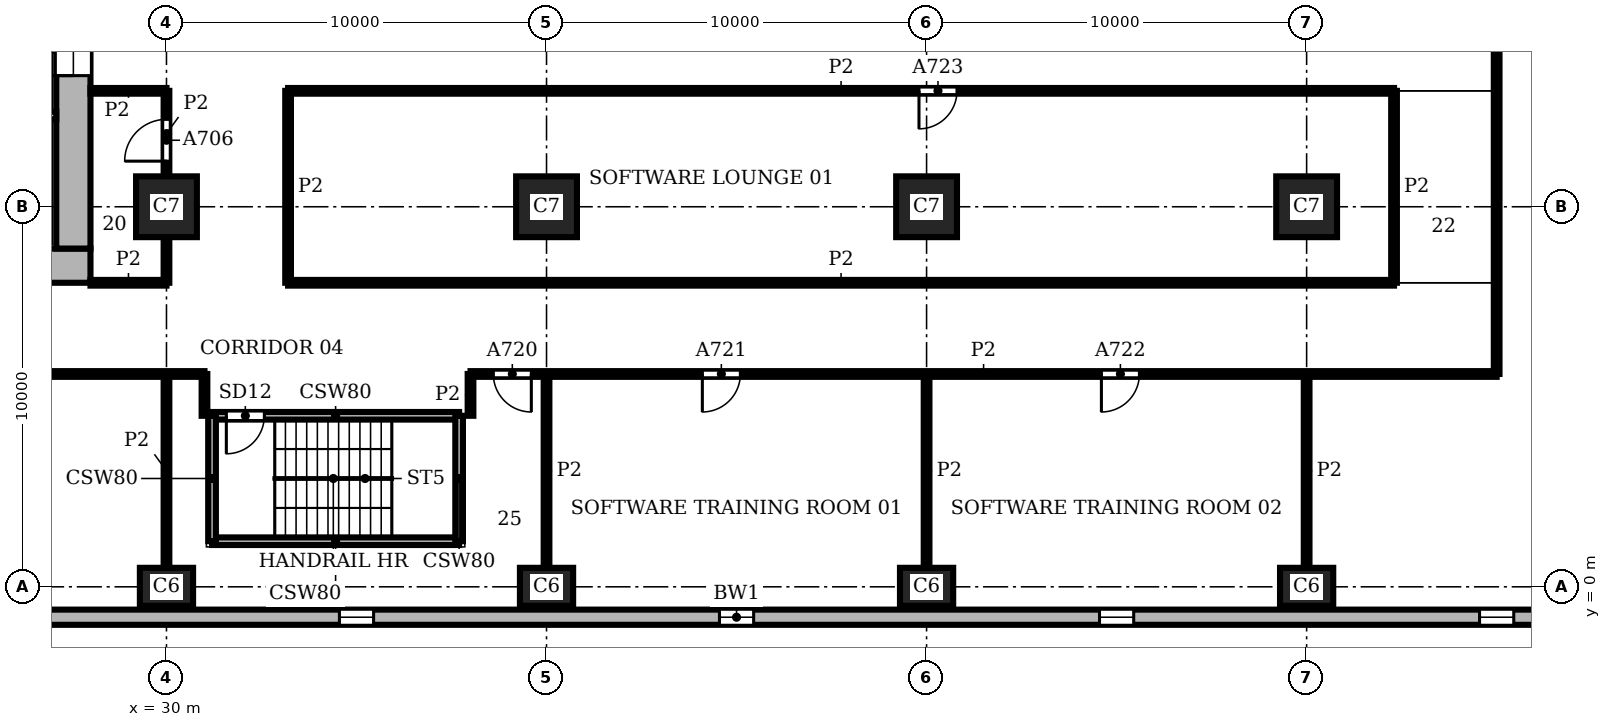
"""IFC4 building model, lengths in metres.
Left out: names, types, materials, properties, quantities, classifications, styles, units other than length and angle.
Written with IfcOpenShell. Run it as: python <this file> out.ifc"""

import sys

from ifc_helpers import new_model, si_unit, direction, frame, frame_2d, origin, origin_2d, place, context, subcontext, project, spatial, rectangle, extrude, element, fill, save


model = new_model("IFC4")
c1 = context("Model", 3, precision=1e-05, world=origin(), true_north=direction((0.0, 1.0)))
c2 = subcontext(c1, "Body", "Model", "MODEL_VIEW")
j1 = project(units=[si_unit("LENGTHUNIT", "METRE"), si_unit("PLANEANGLEUNIT", "RADIAN")], contexts=[c1])
p1 = place(None, origin())
s1 = spatial("IfcSite", under=j1, at=p1, CompositionType="ELEMENT")
p2 = place(p1, origin())
s2 = spatial("IfcBuilding", under=s1, at=p2, CompositionType="ELEMENT")
p3 = place(p2, frame((0.0, 0.0, 86.1)))
s3 = spatial("IfcBuildingStorey", under=s2, at=p3, CompositionType="ELEMENT", Elevation=86.1)
for number, where, z_axis, x_axis in (
    (1, (30.0, 0.0, 0.0), (0.0, 0.0, 1.0), (1.0, 0.0, 0.0)),
    (2, (40.0, 0.0, 0.0), (0.0, 0.0, 1.0), (1.0, 0.0, 0.0)),
    (3, (50.0, 0.0, 0.0), (0.0, 0.0, 1.0), (1.0, 0.0, 0.0)),
    (4, (60.0, 0.0, 0.0), (0.0, 0.0, 1.0), (1.0, 0.0, 0.0)),
):
    element("IfcColumn", number, at=place(p3, frame(where, z_axis=z_axis, x_axis=x_axis)), inside=s3, PredefinedType="COLUMN", context=c2, shape_type="SweptSolid", body=[
        extrude(rectangle(XDim=1.4, YDim=1.0, at=origin_2d()), origin(), (0.0, 0.0, 1.0), 3.9),
    ])
for number, where, z_axis, x_axis in (
    (5, (30.0, 10.0, 0.0), (0.0, 0.0, 1.0), (1.0, 0.0, 0.0)),
    (6, (40.0, 10.0, 0.0), (0.0, 0.0, 1.0), (1.0, 0.0, 0.0)),
    (7, (50.0, 10.0, 0.0), (0.0, 0.0, 1.0), (1.0, 0.0, 0.0)),
    (8, (60.0, 10.0, 0.0), (0.0, 0.0, 1.0), (1.0, 0.0, 0.0)),
):
    element("IfcColumn", number, at=place(p3, frame(where, z_axis=z_axis, x_axis=x_axis)), inside=s3, PredefinedType="COLUMN", context=c2, shape_type="SweptSolid", body=[
        extrude(rectangle(XDim=1.6, YDim=1.6, at=origin_2d()), origin(), (0.0, 0.0, 1.0), 3.9),
    ])
p4 = place(p3, frame((8.0, 8.45, 0.0), z_axis=(0.0, 0.0, 1.0), x_axis=(1.0, 0.0, 0.0)))
e9 = element("IfcWall", 9, at=p4, inside=s3, PredefinedType="SHEAR", context=c2, shape_type="SweptSolid", body=[
    extrude(rectangle(XDim=20.0, YDim=0.9, at=frame_2d((10.0, 0.0))), origin(), (0.0, 0.0, 1.0), 3.9),
])
p5 = place(p3, frame((27.55, 8.9, 0.0), z_axis=(0.0, 0.0, 1.0), x_axis=(0.0, 1.0, 0.0)))
e10 = element("IfcWall", 10, at=p5, inside=s3, PredefinedType="SHEAR", context=c2, shape_type="SweptSolid", body=[
    extrude(rectangle(XDim=18.2, YDim=0.9, at=frame_2d((9.1, 0.0))), origin(), (0.0, 0.0, 1.0), 3.9),
])
p6 = place(p5, frame((4.55, 0.0, 0.0)))
e11 = element("IfcOpeningElement", 11, at=p6, cuts=e10, PredefinedType="OPENING", context=c2, shape_type="SweptSolid", body=[
    extrude(rectangle(XDim=1.6, YDim=2.1, at=frame_2d((0.8, 1.05))), frame((0.0, 0.46, 0.0), z_axis=(0.0, -1.0, 0.0), x_axis=(1.0, 0.0, 0.0)), (0.0, 0.0, 1.0), 0.92),
])
p7 = place(p3, frame((20.8, -0.8, 0.0), z_axis=(0.0, 0.0, 1.0), x_axis=(1.0, 0.0, 0.0)))
e12 = element("IfcWall", 12, at=p7, inside=s3, PredefinedType="SOLIDWALL", context=c2, shape_type="SweptSolid", body=[
    extrude(rectangle(XDim=48.4, YDim=0.4, at=frame_2d((24.2, 0.0))), origin(), (0.0, 0.0, 1.0), 3.9),
])
p8 = place(p7, frame((3.75, 0.0, 0.9)))
e13 = element("IfcOpeningElement", 13, at=p8, cuts=e12, PredefinedType="OPENING", context=c2, shape_type="SweptSolid", body=[
    extrude(rectangle(XDim=0.9, YDim=2.35, at=frame_2d((0.45, 1.175))), frame((0.0, 0.21, 0.0), z_axis=(0.0, -1.0, 0.0), x_axis=(1.0, 0.0, 0.0)), (0.0, 0.0, 1.0), 0.42),
])
p9 = place(p7, frame((13.75, 0.0, 0.9)))
e14 = element("IfcOpeningElement", 14, at=p9, cuts=e12, PredefinedType="OPENING", context=c2, shape_type="SweptSolid", body=[
    extrude(rectangle(XDim=0.9, YDim=2.35, at=frame_2d((0.45, 1.175))), frame((0.0, 0.21, 0.0), z_axis=(0.0, -1.0, 0.0), x_axis=(1.0, 0.0, 0.0)), (0.0, 0.0, 1.0), 0.42),
])
p10 = place(p7, frame((23.75, 0.0, 0.9)))
e15 = element("IfcOpeningElement", 15, at=p10, cuts=e12, PredefinedType="OPENING", context=c2, shape_type="SweptSolid", body=[
    extrude(rectangle(XDim=0.9, YDim=2.35, at=frame_2d((0.45, 1.175))), frame((0.0, 0.21, 0.0), z_axis=(0.0, -1.0, 0.0), x_axis=(1.0, 0.0, 0.0)), (0.0, 0.0, 1.0), 0.42),
])
p11 = place(p7, frame((33.75, 0.0, 0.9)))
e16 = element("IfcOpeningElement", 16, at=p11, cuts=e12, PredefinedType="OPENING", context=c2, shape_type="SweptSolid", body=[
    extrude(rectangle(XDim=0.9, YDim=2.35, at=frame_2d((0.45, 1.175))), frame((0.0, 0.21, 0.0), z_axis=(0.0, -1.0, 0.0), x_axis=(1.0, 0.0, 0.0)), (0.0, 0.0, 1.0), 0.42),
])
p12 = place(p7, frame((43.75, 0.0, 0.9)))
e17 = element("IfcOpeningElement", 17, at=p12, cuts=e12, PredefinedType="OPENING", context=c2, shape_type="SweptSolid", body=[
    extrude(rectangle(XDim=0.9, YDim=2.35, at=frame_2d((0.45, 1.175))), frame((0.0, 0.21, 0.0), z_axis=(0.0, -1.0, 0.0), x_axis=(1.0, 0.0, 0.0)), (0.0, 0.0, 1.0), 0.42),
])
p13 = place(p3, frame((31.2, 1.2, 0.0), z_axis=(0.0, 0.0, 1.0), x_axis=(1.0, 0.0, 0.0)))
e18 = element("IfcWall", 18, at=p13, inside=s3, PredefinedType="SHEAR", context=c2, shape_type="SweptSolid", body=[
    extrude(rectangle(XDim=6.5, YDim=0.2, at=frame_2d((3.25, 0.0))), origin(), (0.0, 0.0, 1.0), 3.58),
])
p14 = place(p3, frame((31.2, 4.5, 0.0), z_axis=(0.0, 0.0, 1.0), x_axis=(1.0, 0.0, 0.0)))
e19 = element("IfcWall", 19, at=p14, inside=s3, PredefinedType="SHEAR", context=c2, shape_type="SweptSolid", body=[
    extrude(rectangle(XDim=6.5, YDim=0.2, at=frame_2d((3.25, 0.0))), origin(), (0.0, 0.0, 1.0), 3.58),
])
p15 = place(p14, frame((0.375, 0.0, 0.0)))
e20 = element("IfcOpeningElement", 20, at=p15, cuts=e19, PredefinedType="OPENING", context=c2, shape_type="SweptSolid", body=[
    extrude(rectangle(XDim=1.0, YDim=2.1, at=frame_2d((0.5, 1.05))), frame((0.0, 0.11, 0.0), z_axis=(0.0, -1.0, 0.0), x_axis=(1.0, 0.0, 0.0)), (0.0, 0.0, 1.0), 0.22),
])
p16 = place(p3, frame((13.8, 12.4, 0.0), z_axis=(0.0, 0.0, 1.0), x_axis=(1.0, 0.0, 0.0)))
e21 = element("IfcWall", 21, at=p16, inside=s3, PredefinedType="SHEAR", context=c2, shape_type="SweptSolid", body=[
    extrude(rectangle(XDim=13.3, YDim=0.2, at=frame_2d((6.65, 0.0))), origin(), (0.0, 0.0, 1.0), 3.58),
])
p17 = place(p16, frame((2.4, 0.0, 0.0)))
e22 = element("IfcOpeningElement", 22, at=p17, cuts=e21, PredefinedType="OPENING", context=c2, shape_type="SweptSolid", body=[
    extrude(rectangle(XDim=1.1, YDim=2.1, at=frame_2d((0.55, 1.05))), frame((0.0, 0.11, 0.0), z_axis=(0.0, -1.0, 0.0), x_axis=(1.0, 0.0, 0.0)), (0.0, 0.0, 1.0), 0.22),
])
p18 = place(p16, frame((4.9, 0.0, 0.0)))
e23 = element("IfcOpeningElement", 23, at=p18, cuts=e21, PredefinedType="OPENING", context=c2, shape_type="SweptSolid", body=[
    extrude(rectangle(XDim=1.1, YDim=2.1, at=frame_2d((0.55, 1.05))), frame((0.0, 0.11, 0.0), z_axis=(0.0, -1.0, 0.0), x_axis=(1.0, 0.0, 0.0)), (0.0, 0.0, 1.0), 0.22),
])
p19 = place(p16, frame((0.25, 0.0, 0.0)))
e24 = element("IfcOpeningElement", 24, at=p19, cuts=e21, PredefinedType="OPENING", context=c2, shape_type="SweptSolid", body=[
    extrude(rectangle(XDim=1.0, YDim=2.1, at=frame_2d((0.5, 1.05))), frame((0.0, 0.11, 0.0), z_axis=(0.0, -1.0, 0.0), x_axis=(1.0, 0.0, 0.0)), (0.0, 0.0, 1.0), 0.22),
])
for number, where, z_axis, x_axis in (
    (25, (31.2, 1.2, 0.0), (0.0, 0.0, 1.0), (0.0, 1.0, 0.0)),
    (26, (37.7, 1.2, 0.0), (0.0, 0.0, 1.0), (0.0, 1.0, 0.0)),
):
    element("IfcWall", number, at=place(p3, frame(where, z_axis=z_axis, x_axis=x_axis)), inside=s3, PredefinedType="SHEAR", context=c2, shape_type="SweptSolid", body=[
        extrude(rectangle(XDim=3.3, YDim=0.2, at=frame_2d((1.65, 0.0))), origin(), (0.0, 0.0, 1.0), 3.58),
    ])
p20 = place(p3, frame((30.0, 0.5, 0.0), z_axis=(0.0, 0.0, 1.0), x_axis=(0.0, 1.0, 0.0)))
e27 = element("IfcWall", 27, at=p20, inside=s3, PredefinedType="PARTITIONING", context=c2, shape_type="SweptSolid", body=[
    extrude(rectangle(XDim=5.1, YDim=0.15, at=frame_2d((2.55, 0.0))), origin(), (0.0, 0.0, 1.0), 3.58),
])
p21 = place(p3, frame((30.0, 8.0, 0.0), z_axis=(0.0, 0.0, 1.0), x_axis=(0.0, 1.0, 0.0)))
e28 = element("IfcWall", 28, at=p21, inside=s3, PredefinedType="PARTITIONING", context=c2, shape_type="SweptSolid", body=[
    extrude(rectangle(XDim=1.2, YDim=0.15, at=frame_2d((0.6, 0.0))), origin(), (0.0, 0.0, 1.0), 3.58),
])
p22 = place(p3, frame((30.0, 10.8, 0.0), z_axis=(0.0, 0.0, 1.0), x_axis=(0.0, 1.0, 0.0)))
e29 = element("IfcWall", 29, at=p22, inside=s3, PredefinedType="PARTITIONING", context=c2, shape_type="SweptSolid", body=[
    extrude(rectangle(XDim=2.25, YDim=0.15, at=frame_2d((1.125, 0.0))), origin(), (0.0, 0.0, 1.0), 3.58),
])
p23 = place(p22, frame((0.4, 0.0, 0.0)))
e30 = element("IfcOpeningElement", 30, at=p23, cuts=e29, PredefinedType="OPENING", context=c2, shape_type="SweptSolid", body=[
    extrude(rectangle(XDim=1.1, YDim=2.1, at=frame_2d((0.55, 1.05))), frame((0.0, 0.085, 0.0), z_axis=(0.0, -1.0, 0.0), x_axis=(1.0, 0.0, 0.0)), (0.0, 0.0, 1.0), 0.17),
])
p24 = place(p3, frame((31.0, 4.5, 0.0), z_axis=(0.0, 0.0, 1.0), x_axis=(0.0, 1.0, 0.0)))
e31 = element("IfcWall", 31, at=p24, inside=s3, PredefinedType="PARTITIONING", context=c2, shape_type="SweptSolid", body=[
    extrude(rectangle(XDim=1.1, YDim=0.15, at=frame_2d((0.55, 0.0))), origin(), (0.0, 0.0, 1.0), 3.58),
])
p25 = place(p3, frame((33.2, 8.0, 0.0), z_axis=(0.0, 0.0, 1.0), x_axis=(0.0, 1.0, 0.0)))
e32 = element("IfcWall", 32, at=p25, inside=s3, PredefinedType="PARTITIONING", context=c2, shape_type="SweptSolid", body=[
    extrude(rectangle(XDim=5.05, YDim=0.15, at=frame_2d((2.525, 0.0))), origin(), (0.0, 0.0, 1.0), 3.58),
])
p26 = place(p3, frame((38.0, 4.5, 0.0), z_axis=(0.0, 0.0, 1.0), x_axis=(0.0, 1.0, 0.0)))
e33 = element("IfcWall", 33, at=p26, inside=s3, PredefinedType="PARTITIONING", context=c2, shape_type="SweptSolid", body=[
    extrude(rectangle(XDim=1.1, YDim=0.15, at=frame_2d((0.55, 0.0))), origin(), (0.0, 0.0, 1.0), 3.58),
])
for number, where, z_axis, x_axis in (
    (34, (40.0, 0.5, 0.0), (0.0, 0.0, 1.0), (0.0, 1.0, 0.0)),
    (35, (50.0, 0.5, 0.0), (0.0, 0.0, 1.0), (0.0, 1.0, 0.0)),
    (36, (60.0, 0.5, 0.0), (0.0, 0.0, 1.0), (0.0, 1.0, 0.0)),
):
    element("IfcWall", number, at=place(p3, frame(where, z_axis=z_axis, x_axis=x_axis)), inside=s3, PredefinedType="PARTITIONING", context=c2, shape_type="SweptSolid", body=[
        extrude(rectangle(XDim=5.1, YDim=0.15, at=frame_2d((2.55, 0.0))), origin(), (0.0, 0.0, 1.0), 3.58),
    ])
p27 = place(p3, frame((62.3, 8.0, 0.0), z_axis=(0.0, 0.0, 1.0), x_axis=(0.0, 1.0, 0.0)))
e37 = element("IfcWall", 37, at=p27, inside=s3, PredefinedType="PARTITIONING", context=c2, shape_type="SweptSolid", body=[
    extrude(rectangle(XDim=5.05, YDim=0.15, at=frame_2d((2.525, 0.0))), origin(), (0.0, 0.0, 1.0), 3.58),
])
p28 = place(p3, frame((65.0, 5.6, 0.0), z_axis=(0.0, 0.0, 1.0), x_axis=(0.0, 1.0, 0.0)))
e38 = element("IfcWall", 38, at=p28, inside=s3, PredefinedType="PARTITIONING", context=c2, shape_type="SweptSolid", body=[
    extrude(rectangle(XDim=19.35, YDim=0.15, at=frame_2d((9.675, 0.0))), origin(), (0.0, 0.0, 1.0), 3.58),
])
p29 = place(p3, frame((5.6, 5.6, 0.0), z_axis=(0.0, 0.0, 1.0), x_axis=(1.0, 0.0, 0.0)))
e39 = element("IfcWall", 39, at=p29, inside=s3, PredefinedType="PARTITIONING", context=c2, shape_type="SweptSolid", body=[
    extrude(rectangle(XDim=25.4, YDim=0.15, at=frame_2d((12.7, 0.0))), origin(), (0.0, 0.0, 1.0), 3.58),
])
p30 = place(p29, frame((4.6, 0.0, 0.0)))
e40 = element("IfcOpeningElement", 40, at=p30, cuts=e39, PredefinedType="OPENING", context=c2, shape_type="SweptSolid", body=[
    extrude(rectangle(XDim=1.0, YDim=2.1, at=frame_2d((0.5, 1.05))), frame((0.0, 0.085, 0.0), z_axis=(0.0, -1.0, 0.0), x_axis=(1.0, 0.0, 0.0)), (0.0, 0.0, 1.0), 0.17),
])
p31 = place(p29, frame((11.0, 0.0, 0.0)))
e41 = element("IfcOpeningElement", 41, at=p31, cuts=e39, PredefinedType="OPENING", context=c2, shape_type="SweptSolid", body=[
    extrude(rectangle(XDim=0.8, YDim=2.1, at=frame_2d((0.4, 1.05))), frame((0.0, 0.085, 0.0), z_axis=(0.0, -1.0, 0.0), x_axis=(1.0, 0.0, 0.0)), (0.0, 0.0, 1.0), 0.17),
])
p32 = place(p29, frame((20.0, 0.0, 0.0)))
e42 = element("IfcOpeningElement", 42, at=p32, cuts=e39, PredefinedType="OPENING", context=c2, shape_type="SweptSolid", body=[
    extrude(rectangle(XDim=1.0, YDim=2.1, at=frame_2d((0.5, 1.05))), frame((0.0, 0.085, 0.0), z_axis=(0.0, -1.0, 0.0), x_axis=(1.0, 0.0, 0.0)), (0.0, 0.0, 1.0), 0.17),
])
p33 = place(p3, frame((38.0, 5.6, 0.0), z_axis=(0.0, 0.0, 1.0), x_axis=(1.0, 0.0, 0.0)))
e43 = element("IfcWall", 43, at=p33, inside=s3, PredefinedType="PARTITIONING", context=c2, shape_type="SweptSolid", body=[
    extrude(rectangle(XDim=27.0, YDim=0.15, at=frame_2d((13.5, 0.0))), origin(), (0.0, 0.0, 1.0), 3.58),
])
p34 = place(p33, frame((0.6, 0.0, 0.0)))
e44 = element("IfcOpeningElement", 44, at=p34, cuts=e43, PredefinedType="OPENING", context=c2, shape_type="SweptSolid", body=[
    extrude(rectangle(XDim=1.0, YDim=2.1, at=frame_2d((0.5, 1.05))), frame((0.0, 0.085, 0.0), z_axis=(0.0, -1.0, 0.0), x_axis=(1.0, 0.0, 0.0)), (0.0, 0.0, 1.0), 0.17),
])
p35 = place(p33, frame((6.1, 0.0, 0.0)))
e45 = element("IfcOpeningElement", 45, at=p35, cuts=e43, PredefinedType="OPENING", context=c2, shape_type="SweptSolid", body=[
    extrude(rectangle(XDim=1.0, YDim=2.1, at=frame_2d((0.5, 1.05))), frame((0.0, 0.085, 0.0), z_axis=(0.0, -1.0, 0.0), x_axis=(1.0, 0.0, 0.0)), (0.0, 0.0, 1.0), 0.17),
])
p36 = place(p33, frame((16.6, 0.0, 0.0)))
e46 = element("IfcOpeningElement", 46, at=p36, cuts=e43, PredefinedType="OPENING", context=c2, shape_type="SweptSolid", body=[
    extrude(rectangle(XDim=1.0, YDim=2.1, at=frame_2d((0.5, 1.05))), frame((0.0, 0.085, 0.0), z_axis=(0.0, -1.0, 0.0), x_axis=(1.0, 0.0, 0.0)), (0.0, 0.0, 1.0), 0.17),
])
p37 = place(p3, frame((28.0, 8.0, 0.0), z_axis=(0.0, 0.0, 1.0), x_axis=(1.0, 0.0, 0.0)))
e47 = element("IfcWall", 47, at=p37, inside=s3, PredefinedType="PARTITIONING", context=c2, shape_type="SweptSolid", body=[
    extrude(rectangle(XDim=2.0, YDim=0.15, at=frame_2d((1.0, 0.0))), origin(), (0.0, 0.0, 1.0), 3.58),
])
p38 = place(p3, frame((33.2, 8.0, 0.0), z_axis=(0.0, 0.0, 1.0), x_axis=(1.0, 0.0, 0.0)))
e48 = element("IfcWall", 48, at=p38, inside=s3, PredefinedType="PARTITIONING", context=c2, shape_type="SweptSolid", body=[
    extrude(rectangle(XDim=29.1, YDim=0.15, at=frame_2d((14.55, 0.0))), origin(), (0.0, 0.0, 1.0), 3.58),
])
p39 = place(p3, frame((28.0, 13.05, 0.0), z_axis=(0.0, 0.0, 1.0), x_axis=(1.0, 0.0, 0.0)))
e49 = element("IfcWall", 49, at=p39, inside=s3, PredefinedType="PARTITIONING", context=c2, shape_type="SweptSolid", body=[
    extrude(rectangle(XDim=2.0, YDim=0.15, at=frame_2d((1.0, 0.0))), origin(), (0.0, 0.0, 1.0), 3.58),
])
p40 = place(p3, frame((33.2, 13.05, 0.0), z_axis=(0.0, 0.0, 1.0), x_axis=(1.0, 0.0, 0.0)))
e50 = element("IfcWall", 50, at=p40, inside=s3, PredefinedType="PARTITIONING", context=c2, shape_type="SweptSolid", body=[
    extrude(rectangle(XDim=29.1, YDim=0.15, at=frame_2d((14.55, 0.0))), origin(), (0.0, 0.0, 1.0), 3.58),
])
p41 = place(p40, frame((16.6, 0.0, 0.0)))
e51 = element("IfcOpeningElement", 51, at=p41, cuts=e50, PredefinedType="OPENING", context=c2, shape_type="SweptSolid", body=[
    extrude(rectangle(XDim=1.0, YDim=2.1, at=frame_2d((0.5, 1.05))), frame((0.0, 0.085, 0.0), z_axis=(0.0, -1.0, 0.0), x_axis=(1.0, 0.0, 0.0)), (0.0, 0.0, 1.0), 0.17),
])
p42 = place(p9, origin())
e52 = element("IfcWindow", 52, at=p42, inside=s3, PartitioningType="SINGLE_PANEL", PredefinedType="WINDOW", context=c2, shape_type="SweptSolid", body=[
    extrude(rectangle(XDim=0.9, YDim=2.35, at=frame_2d((0.45, 1.175))), frame((0.0, 0.16, 0.0), z_axis=(0.0, -1.0, 0.0), x_axis=(1.0, 0.0, 0.0)), (0.0, 0.0, 1.0), 0.06),
])
fill(e14, e52)
p43 = place(p10, origin())
e53 = element("IfcWindow", 53, at=p43, inside=s3, PartitioningType="SINGLE_PANEL", PredefinedType="WINDOW", context=c2, shape_type="SweptSolid", body=[
    extrude(rectangle(XDim=0.9, YDim=2.35, at=frame_2d((0.45, 1.175))), frame((0.0, 0.16, 0.0), z_axis=(0.0, -1.0, 0.0), x_axis=(1.0, 0.0, 0.0)), (0.0, 0.0, 1.0), 0.06),
])
fill(e15, e53)
p44 = place(p11, origin())
e54 = element("IfcWindow", 54, at=p44, inside=s3, PartitioningType="SINGLE_PANEL", PredefinedType="WINDOW", context=c2, shape_type="SweptSolid", body=[
    extrude(rectangle(XDim=0.9, YDim=2.35, at=frame_2d((0.45, 1.175))), frame((0.0, 0.16, 0.0), z_axis=(0.0, -1.0, 0.0), x_axis=(1.0, 0.0, 0.0)), (0.0, 0.0, 1.0), 0.06),
])
fill(e16, e54)
p45 = place(p12, origin())
e55 = element("IfcWindow", 55, at=p45, inside=s3, PartitioningType="SINGLE_PANEL", PredefinedType="WINDOW", context=c2, shape_type="SweptSolid", body=[
    extrude(rectangle(XDim=0.9, YDim=2.35, at=frame_2d((0.45, 1.175))), frame((0.0, 0.16, 0.0), z_axis=(0.0, -1.0, 0.0), x_axis=(1.0, 0.0, 0.0)), (0.0, 0.0, 1.0), 0.06),
])
fill(e17, e55)
p46 = place(p15, frame((1.0, 0.0, 0.0), z_axis=(0.0, 0.0, 1.0), x_axis=(-1.0, 0.0, 0.0)))
e56 = element("IfcDoor", 56, at=p46, inside=s3, OperationType="SINGLE_SWING_RIGHT", PredefinedType="DOOR", context=c2, shape_type="SweptSolid", body=[
    extrude(rectangle(XDim=1.0, YDim=2.1, at=frame_2d((0.5, 1.05))), frame((0.0, 0.025, 0.0), z_axis=(0.0, -1.0, 0.0), x_axis=(1.0, 0.0, 0.0)), (0.0, 0.0, 1.0), 0.05),
])
fill(e20, e56)
p47 = place(p6, origin())
e57 = element("IfcDoor", 57, at=p47, inside=s3, OperationType="DOUBLE_DOOR_SINGLE_SWING", PredefinedType="DOOR", context=c2, shape_type="SweptSolid", body=[
    extrude(rectangle(XDim=1.6, YDim=2.1, at=frame_2d((0.8, 1.05))), frame((0.0, 0.025, 0.0), z_axis=(0.0, -1.0, 0.0), x_axis=(1.0, 0.0, 0.0)), (0.0, 0.0, 1.0), 0.05),
])
fill(e11, e57)
p48 = place(p23, origin())
e58 = element("IfcDoor", 58, at=p48, inside=s3, OperationType="SINGLE_SWING_LEFT", PredefinedType="DOOR", context=c2, shape_type="SweptSolid", body=[
    extrude(rectangle(XDim=1.1, YDim=2.1, at=frame_2d((0.55, 1.05))), frame((0.0, 0.025, 0.0), z_axis=(0.0, -1.0, 0.0), x_axis=(1.0, 0.0, 0.0)), (0.0, 0.0, 1.0), 0.05),
])
fill(e30, e58)
p49 = place(p34, frame((1.0, 0.0, 0.0), z_axis=(0.0, 0.0, 1.0), x_axis=(-1.0, 0.0, 0.0)))
e59 = element("IfcDoor", 59, at=p49, inside=s3, OperationType="SINGLE_SWING_LEFT", PredefinedType="DOOR", context=c2, shape_type="SweptSolid", body=[
    extrude(rectangle(XDim=1.0, YDim=2.1, at=frame_2d((0.5, 1.05))), frame((0.0, 0.025, 0.0), z_axis=(0.0, -1.0, 0.0), x_axis=(1.0, 0.0, 0.0)), (0.0, 0.0, 1.0), 0.05),
])
fill(e44, e59)
p50 = place(p35, frame((1.0, 0.0, 0.0), z_axis=(0.0, 0.0, 1.0), x_axis=(-1.0, 0.0, 0.0)))
e60 = element("IfcDoor", 60, at=p50, inside=s3, OperationType="SINGLE_SWING_RIGHT", PredefinedType="DOOR", context=c2, shape_type="SweptSolid", body=[
    extrude(rectangle(XDim=1.0, YDim=2.1, at=frame_2d((0.5, 1.05))), frame((0.0, 0.025, 0.0), z_axis=(0.0, -1.0, 0.0), x_axis=(1.0, 0.0, 0.0)), (0.0, 0.0, 1.0), 0.05),
])
fill(e45, e60)
p51 = place(p36, frame((1.0, 0.0, 0.0), z_axis=(0.0, 0.0, 1.0), x_axis=(-1.0, 0.0, 0.0)))
e61 = element("IfcDoor", 61, at=p51, inside=s3, OperationType="SINGLE_SWING_RIGHT", PredefinedType="DOOR", context=c2, shape_type="SweptSolid", body=[
    extrude(rectangle(XDim=1.0, YDim=2.1, at=frame_2d((0.5, 1.05))), frame((0.0, 0.025, 0.0), z_axis=(0.0, -1.0, 0.0), x_axis=(1.0, 0.0, 0.0)), (0.0, 0.0, 1.0), 0.05),
])
fill(e46, e61)
p52 = place(p41, frame((1.0, 0.0, 0.0), z_axis=(0.0, 0.0, 1.0), x_axis=(-1.0, 0.0, 0.0)))
e62 = element("IfcDoor", 62, at=p52, inside=s3, OperationType="SINGLE_SWING_RIGHT", PredefinedType="DOOR", context=c2, shape_type="SweptSolid", body=[
    extrude(rectangle(XDim=1.0, YDim=2.1, at=frame_2d((0.5, 1.05))), frame((0.0, 0.025, 0.0), z_axis=(0.0, -1.0, 0.0), x_axis=(1.0, 0.0, 0.0)), (0.0, 0.0, 1.0), 0.05),
])
fill(e51, e62)
save(model, sys.argv[1])
